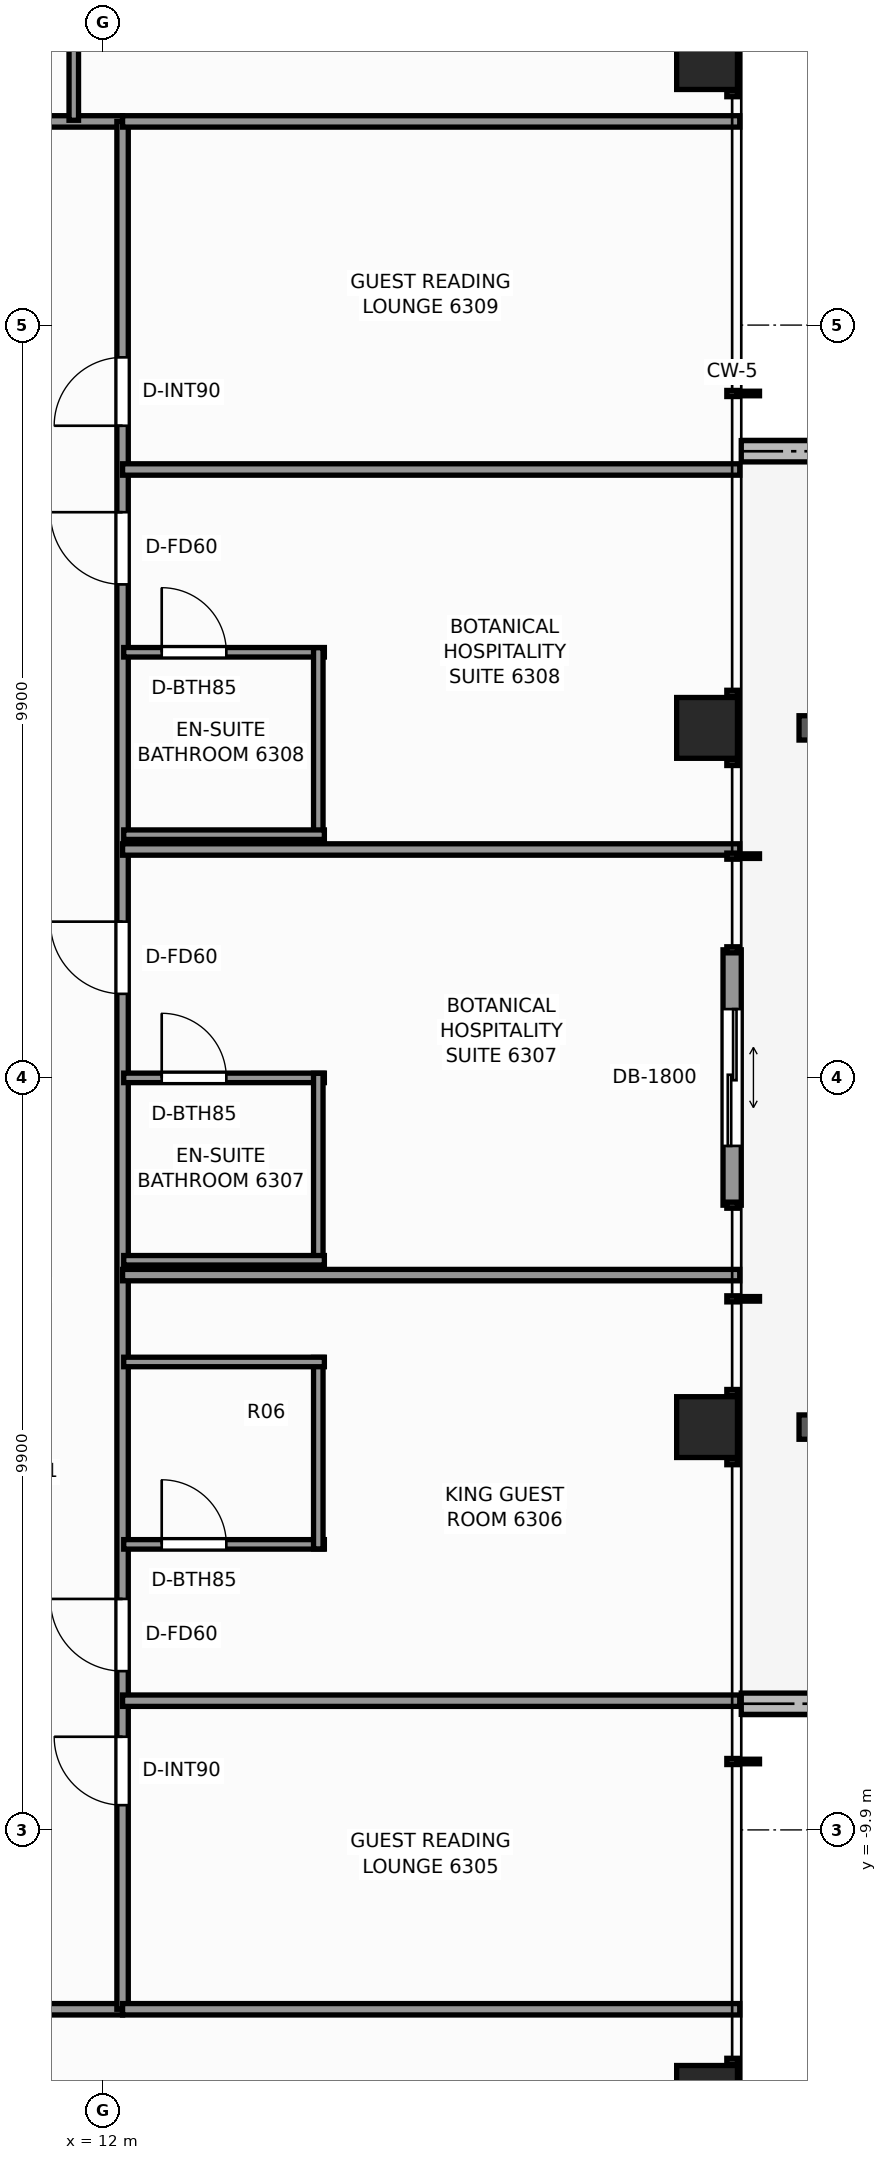
"""IFC4 building model, lengths in metres.
Left out: names, types, materials, properties, quantities, classifications, styles, units other than length and angle.
Written with IfcOpenShell. Run it as: python <this file> out.ifc"""

import sys

from ifc_helpers import new_model, si_unit, direction, frame, frame_2d, origin, origin_2d, place, context, subcontext, project, spatial, rectangle, extrude, element, fill, save


model = new_model("IFC4")
c1 = context("Model", 3, precision=1e-05, world=origin(), true_north=direction((0.0, 1.0)))
c2 = subcontext(c1, "Body", "Model", "MODEL_VIEW")
j1 = project(units=[si_unit("LENGTHUNIT", "METRE"), si_unit("PLANEANGLEUNIT", "RADIAN")], contexts=[c1])
p1 = place(None, origin())
s1 = spatial("IfcSite", under=j1, at=p1, CompositionType="ELEMENT")
p2 = place(p1, origin())
s2 = spatial("IfcBuilding", under=s1, at=p2, CompositionType="ELEMENT")
p3 = place(p2, frame((0.0, 0.0, 216.3)))
s3 = spatial("IfcBuildingStorey", under=s2, at=p3, CompositionType="ELEMENT", Elevation=216.3)
for number, where, z_axis, x_axis in (
    (1, (19.95, -13.4, 0.0), (0.0, 0.0, 1.0), (1.0, 0.0, 0.0)),
    (2, (19.95, -4.6, 0.0), (0.0, 0.0, 1.0), (1.0, 0.0, 0.0)),
    (3, (19.95, 4.6, 0.0), (0.0, 0.0, 1.0), (1.0, 0.0, 0.0)),
    (4, (19.95, 13.4, 0.0), (0.0, 0.0, 1.0), (1.0, 0.0, 0.0)),
):
    element("IfcColumn", number, at=place(p3, frame(where, z_axis=z_axis, x_axis=x_axis)), inside=s3, PredefinedType="COLUMN", context=c2, shape_type="SweptSolid", body=[
        extrude(rectangle(XDim=0.8, YDim=0.8, at=origin_2d()), origin(), (0.0, 0.0, 1.0), 3.3),
    ])
p4 = place(p3, frame((22.105, 8.24, -0.04), z_axis=(0.0, 0.0, 1.0), x_axis=(-1.0, 0.0, 0.0)))
e5 = element("IfcWall", 5, at=p4, inside=s3, PredefinedType="PARAPET", context=c2, shape_type="SweptSolid", body=[
    extrude(rectangle(XDim=1.705, YDim=0.28, at=frame_2d((0.853, 0.0))), origin(), (0.0, 0.0, 1.0), 0.42),
])
p5 = place(p3, frame((20.4, -8.24, -0.04), z_axis=(0.0, 0.0, 1.0), x_axis=(1.0, 0.0, 0.0)))
e6 = element("IfcWall", 6, at=p5, inside=s3, PredefinedType="PARAPET", context=c2, shape_type="SweptSolid", body=[
    extrude(rectangle(XDim=2.975, YDim=0.28, at=frame_2d((1.487, 0.0))), origin(), (0.0, 0.0, 1.0), 0.42),
])
p6 = place(p3, frame((20.28, 1.68, 0.0), z_axis=(0.0, 0.0, 1.0), x_axis=(0.0, -1.0, 0.0)))
e7 = element("IfcWall", 7, at=p6, inside=s3, PredefinedType="STANDARD", context=c2, shape_type="SweptSolid", body=[
    extrude(rectangle(XDim=3.36, YDim=0.24, at=frame_2d((1.68, 0.0))), origin(), (0.0, 0.0, 1.0), 3.08),
])
p7 = place(p6, frame((0.78, 0.0, 0.0)))
e8 = element("IfcOpeningElement", 8, at=p7, cuts=e7, PredefinedType="OPENING", context=c2, shape_type="SweptSolid", body=[
    extrude(rectangle(XDim=1.8, YDim=2.2, at=frame_2d((0.9, 1.1))), frame((0.0, 0.13, 0.0), z_axis=(0.0, -1.0, 0.0), x_axis=(1.0, 0.0, 0.0)), (0.0, 0.0, 1.0), 0.26),
])
p8 = place(p3, frame((-12.26, -12.26, 0.0), z_axis=(0.0, 0.0, 1.0), x_axis=(1.0, 0.0, 0.0)))
e9 = element("IfcWall", 9, at=p8, inside=s3, PredefinedType="PARTITIONING", context=c2, shape_type="SweptSolid", body=[
    extrude(rectangle(XDim=24.52, YDim=0.15, at=frame_2d((12.26, 0.0))), origin(), (0.0, 0.0, 1.0), 2.369),
])
p9 = place(p8, frame((3.427, 0.0, 0.0)))
e10 = element("IfcOpeningElement", 10, at=p9, cuts=e9, PredefinedType="OPENING", context=c2, shape_type="SweptSolid", body=[
    extrude(rectangle(XDim=0.9, YDim=2.06, at=frame_2d((0.45, 1.03))), frame((0.0, 0.085, 0.0), z_axis=(0.0, -1.0, 0.0), x_axis=(1.0, 0.0, 0.0)), (0.0, 0.0, 1.0), 0.17),
])
p10 = place(p8, frame((5.762, 0.0, 0.0)))
e11 = element("IfcOpeningElement", 11, at=p10, cuts=e9, PredefinedType="OPENING", context=c2, shape_type="SweptSolid", body=[
    extrude(rectangle(XDim=0.9, YDim=2.06, at=frame_2d((0.45, 1.03))), frame((0.0, 0.085, 0.0), z_axis=(0.0, -1.0, 0.0), x_axis=(1.0, 0.0, 0.0)), (0.0, 0.0, 1.0), 0.17),
])
p11 = place(p8, frame((9.473, 0.0, 0.0)))
e12 = element("IfcOpeningElement", 12, at=p11, cuts=e9, PredefinedType="OPENING", context=c2, shape_type="SweptSolid", body=[
    extrude(rectangle(XDim=0.9, YDim=2.06, at=frame_2d((0.45, 1.03))), frame((0.0, 0.085, 0.0), z_axis=(0.0, -1.0, 0.0), x_axis=(1.0, 0.0, 0.0)), (0.0, 0.0, 1.0), 0.17),
])
p12 = place(p8, frame((12.875, 0.0, 0.0)))
e13 = element("IfcOpeningElement", 13, at=p12, cuts=e9, PredefinedType="OPENING", context=c2, shape_type="SweptSolid", body=[
    extrude(rectangle(XDim=0.95, YDim=2.06, at=frame_2d((0.475, 1.03))), frame((0.0, 0.085, 0.0), z_axis=(0.0, -1.0, 0.0), x_axis=(1.0, 0.0, 0.0)), (0.0, 0.0, 1.0), 0.17),
])
p13 = place(p8, frame((18.625, 0.0, 0.0)))
e14 = element("IfcOpeningElement", 14, at=p13, cuts=e9, PredefinedType="OPENING", context=c2, shape_type="SweptSolid", body=[
    extrude(rectangle(XDim=0.9, YDim=2.06, at=frame_2d((0.45, 1.03))), frame((0.0, 0.085, 0.0), z_axis=(0.0, -1.0, 0.0), x_axis=(1.0, 0.0, 0.0)), (0.0, 0.0, 1.0), 0.17),
])
p14 = place(p8, frame((20.959, 0.0, 0.0)))
e15 = element("IfcOpeningElement", 15, at=p14, cuts=e9, PredefinedType="OPENING", context=c2, shape_type="SweptSolid", body=[
    extrude(rectangle(XDim=0.9, YDim=2.06, at=frame_2d((0.45, 1.03))), frame((0.0, 0.085, 0.0), z_axis=(0.0, -1.0, 0.0), x_axis=(1.0, 0.0, 0.0)), (0.0, 0.0, 1.0), 0.17),
])
p15 = place(p3, frame((-12.26, 12.58, 0.0), z_axis=(0.0, 0.0, 1.0), x_axis=(1.0, 0.0, 0.0)))
e16 = element("IfcWall", 16, at=p15, inside=s3, PredefinedType="PARTITIONING", context=c2, shape_type="SweptSolid", body=[
    extrude(rectangle(XDim=24.52, YDim=0.15, at=frame_2d((12.26, 0.0))), origin(), (0.0, 0.0, 1.0), 2.369),
])
p16 = place(p15, frame((3.803, 0.0, 0.0)))
e17 = element("IfcOpeningElement", 17, at=p16, cuts=e16, PredefinedType="OPENING", context=c2, shape_type="SweptSolid", body=[
    extrude(rectangle(XDim=0.95, YDim=2.06, at=frame_2d((0.475, 1.03))), frame((0.0, 0.085, 0.0), z_axis=(0.0, -1.0, 0.0), x_axis=(1.0, 0.0, 0.0)), (0.0, 0.0, 1.0), 0.17),
])
p17 = place(p15, frame((5.762, 0.0, 0.0)))
e18 = element("IfcOpeningElement", 18, at=p17, cuts=e16, PredefinedType="OPENING", context=c2, shape_type="SweptSolid", body=[
    extrude(rectangle(XDim=0.9, YDim=2.06, at=frame_2d((0.45, 1.03))), frame((0.0, 0.085, 0.0), z_axis=(0.0, -1.0, 0.0), x_axis=(1.0, 0.0, 0.0)), (0.0, 0.0, 1.0), 0.17),
])
p18 = place(p15, frame((13.518, 0.0, 0.0)))
e19 = element("IfcOpeningElement", 19, at=p18, cuts=e16, PredefinedType="OPENING", context=c2, shape_type="SweptSolid", body=[
    extrude(rectangle(XDim=0.95, YDim=2.06, at=frame_2d((0.475, 1.03))), frame((0.0, 0.085, 0.0), z_axis=(0.0, -1.0, 0.0), x_axis=(1.0, 0.0, 0.0)), (0.0, 0.0, 1.0), 0.17),
])
p19 = place(p15, frame((17.858, 0.0, 0.0)))
e20 = element("IfcOpeningElement", 20, at=p19, cuts=e16, PredefinedType="OPENING", context=c2, shape_type="SweptSolid", body=[
    extrude(rectangle(XDim=0.9, YDim=2.06, at=frame_2d((0.45, 1.03))), frame((0.0, 0.085, 0.0), z_axis=(0.0, -1.0, 0.0), x_axis=(1.0, 0.0, 0.0)), (0.0, 0.0, 1.0), 0.17),
])
p20 = place(p15, frame((19.767, 0.0, 0.0)))
e21 = element("IfcOpeningElement", 21, at=p20, cuts=e16, PredefinedType="OPENING", context=c2, shape_type="SweptSolid", body=[
    extrude(rectangle(XDim=0.95, YDim=2.06, at=frame_2d((0.475, 1.03))), frame((0.0, 0.085, 0.0), z_axis=(0.0, -1.0, 0.0), x_axis=(1.0, 0.0, 0.0)), (0.0, 0.0, 1.0), 0.17),
])
p21 = place(p3, frame((12.26, -12.26, 0.0), z_axis=(0.0, 0.0, 1.0), x_axis=(0.0, 1.0, 0.0)))
e22 = element("IfcWall", 22, at=p21, inside=s3, PredefinedType="PARTITIONING", context=c2, shape_type="SweptSolid", body=[
    extrude(rectangle(XDim=24.84, YDim=0.15, at=frame_2d((12.42, 0.0))), origin(), (0.0, 0.0, 1.0), 2.369),
])
p22 = place(p21, frame((2.686, 0.0, 0.0)))
e23 = element("IfcOpeningElement", 23, at=p22, cuts=e22, PredefinedType="OPENING", context=c2, shape_type="SweptSolid", body=[
    extrude(rectangle(XDim=0.9, YDim=2.06, at=frame_2d((0.45, 1.03))), frame((0.0, 0.085, 0.0), z_axis=(0.0, -1.0, 0.0), x_axis=(1.0, 0.0, 0.0)), (0.0, 0.0, 1.0), 0.17),
])
p23 = place(p21, frame((4.449, 0.0, 0.0)))
e24 = element("IfcOpeningElement", 24, at=p23, cuts=e22, PredefinedType="OPENING", context=c2, shape_type="SweptSolid", body=[
    extrude(rectangle(XDim=0.95, YDim=2.06, at=frame_2d((0.475, 1.03))), frame((0.0, 0.085, 0.0), z_axis=(0.0, -1.0, 0.0), x_axis=(1.0, 0.0, 0.0)), (0.0, 0.0, 1.0), 0.17),
])
p24 = place(p21, frame((13.361, 0.0, 0.0)))
e25 = element("IfcOpeningElement", 25, at=p24, cuts=e22, PredefinedType="OPENING", context=c2, shape_type="SweptSolid", body=[
    extrude(rectangle(XDim=0.95, YDim=2.06, at=frame_2d((0.475, 1.03))), frame((0.0, 0.085, 0.0), z_axis=(0.0, -1.0, 0.0), x_axis=(1.0, 0.0, 0.0)), (0.0, 0.0, 1.0), 0.17),
])
p25 = place(p21, frame((18.748, 0.0, 0.0)))
e26 = element("IfcOpeningElement", 26, at=p25, cuts=e22, PredefinedType="OPENING", context=c2, shape_type="SweptSolid", body=[
    extrude(rectangle(XDim=0.95, YDim=2.06, at=frame_2d((0.475, 1.03))), frame((0.0, 0.085, 0.0), z_axis=(0.0, -1.0, 0.0), x_axis=(1.0, 0.0, 0.0)), (0.0, 0.0, 1.0), 0.17),
])
p26 = place(p21, frame((20.836, 0.0, 0.0)))
e27 = element("IfcOpeningElement", 27, at=p26, cuts=e22, PredefinedType="OPENING", context=c2, shape_type="SweptSolid", body=[
    extrude(rectangle(XDim=0.9, YDim=2.06, at=frame_2d((0.45, 1.03))), frame((0.0, 0.085, 0.0), z_axis=(0.0, -1.0, 0.0), x_axis=(1.0, 0.0, 0.0)), (0.0, 0.0, 1.0), 0.17),
])
for number, where, z_axis, x_axis in (
    (28, (12.26, -12.26, 0.0), (0.0, 0.0, 1.0), (1.0, 0.0, 0.0)),
    (29, (12.26, 12.58, 0.0), (0.0, 0.0, 1.0), (1.0, 0.0, 0.0)),
):
    element("IfcWall", number, at=place(p3, frame(where, z_axis=z_axis, x_axis=x_axis)), inside=s3, PredefinedType="PARTITIONING", context=c2, shape_type="SweptSolid", body=[
        extrude(rectangle(XDim=8.12, YDim=0.15, at=frame_2d((4.06, 0.0))), origin(), (0.0, 0.0, 1.0), 2.369),
    ])
for number, where, z_axis, x_axis in (
    (30, (12.26, -8.2, 0.0), (0.0, 0.0, 1.0), (1.0, 0.0, 0.0)),
    (31, (12.26, -2.6, 0.0), (0.0, 0.0, 1.0), (1.0, 0.0, 0.0)),
):
    element("IfcWall", number, at=place(p3, frame(where, z_axis=z_axis, x_axis=x_axis)), inside=s3, PredefinedType="PARTITIONING", context=c2, shape_type="SweptSolid", body=[
        extrude(rectangle(XDim=8.12, YDim=0.15, at=frame_2d((4.06, 0.0))), origin(), (0.0, 0.0, 1.0), 2.453),
    ])
p27 = place(p3, frame((12.275, -6.143, 0.0), z_axis=(0.0, 0.0, 1.0), x_axis=(1.0, 0.0, 0.0)))
e32 = element("IfcWall", 32, at=p27, inside=s3, PredefinedType="PARTITIONING", context=c2, shape_type="SweptSolid", body=[
    extrude(rectangle(XDim=2.64, YDim=0.125, at=frame_2d((1.32, 0.0))), origin(), (0.0, 0.0, 1.0), 3.08),
])
p28 = place(p27, frame((0.5, 0.0, 0.0)))
e33 = element("IfcOpeningElement", 33, at=p28, cuts=e32, PredefinedType="OPENING", context=c2, shape_type="SweptSolid", body=[
    extrude(rectangle(XDim=0.85, YDim=2.03, at=frame_2d((0.425, 1.015))), frame((0.0, 0.073, 0.0), z_axis=(0.0, -1.0, 0.0), x_axis=(1.0, 0.0, 0.0)), (0.0, 0.0, 1.0), 0.145),
])
p29 = place(p3, frame((14.835, -6.203, 0.0), z_axis=(0.0, 0.0, 1.0), x_axis=(0.0, 1.0, 0.0)))
e34 = element("IfcWall", 34, at=p29, inside=s3, PredefinedType="PARTITIONING", context=c2, shape_type="SweptSolid", body=[
    extrude(rectangle(XDim=2.52, YDim=0.125, at=frame_2d((1.26, 0.0))), origin(), (0.0, 0.0, 1.0), 2.369),
])
p30 = place(p3, frame((12.275, -3.743, 0.0), z_axis=(0.0, 0.0, 1.0), x_axis=(1.0, 0.0, 0.0)))
e35 = element("IfcWall", 35, at=p30, inside=s3, PredefinedType="PARTITIONING", context=c2, shape_type="SweptSolid", body=[
    extrude(rectangle(XDim=2.64, YDim=0.125, at=frame_2d((1.32, 0.0))), origin(), (0.0, 0.0, 1.0), 3.08),
])
p31 = place(p3, frame((12.26, 3.0, 0.0), z_axis=(0.0, 0.0, 1.0), x_axis=(1.0, 0.0, 0.0)))
e36 = element("IfcWall", 36, at=p31, inside=s3, PredefinedType="PARTITIONING", context=c2, shape_type="SweptSolid", body=[
    extrude(rectangle(XDim=8.12, YDim=0.15, at=frame_2d((4.06, 0.0))), origin(), (0.0, 0.0, 1.0), 2.453),
])
p32 = place(p3, frame((12.275, -0.005, 0.0), z_axis=(0.0, 0.0, 1.0), x_axis=(1.0, 0.0, 0.0)))
e37 = element("IfcWall", 37, at=p32, inside=s3, PredefinedType="PARTITIONING", context=c2, shape_type="SweptSolid", body=[
    extrude(rectangle(XDim=2.64, YDim=0.125, at=frame_2d((1.32, 0.0))), origin(), (0.0, 0.0, 1.0), 2.605),
])
p33 = place(p32, frame((0.5, 0.0, 0.0)))
e38 = element("IfcOpeningElement", 38, at=p33, cuts=e37, PredefinedType="OPENING", context=c2, shape_type="SweptSolid", body=[
    extrude(rectangle(XDim=0.85, YDim=2.03, at=frame_2d((0.425, 1.015))), frame((0.0, 0.073, 0.0), z_axis=(0.0, -1.0, 0.0), x_axis=(1.0, 0.0, 0.0)), (0.0, 0.0, 1.0), 0.145),
])
p34 = place(p3, frame((14.835, -2.465, 0.0), z_axis=(0.0, 0.0, 1.0), x_axis=(0.0, 1.0, 0.0)))
e39 = element("IfcWall", 39, at=p34, inside=s3, PredefinedType="PARTITIONING", context=c2, shape_type="SweptSolid", body=[
    extrude(rectangle(XDim=2.52, YDim=0.125, at=frame_2d((1.26, 0.0))), origin(), (0.0, 0.0, 1.0), 2.605),
])
p35 = place(p3, frame((12.275, -2.405, 0.0), z_axis=(0.0, 0.0, 1.0), x_axis=(1.0, 0.0, 0.0)))
e40 = element("IfcWall", 40, at=p35, inside=s3, PredefinedType="PARTITIONING", context=c2, shape_type="SweptSolid", body=[
    extrude(rectangle(XDim=2.64, YDim=0.125, at=frame_2d((1.32, 0.0))), origin(), (0.0, 0.0, 1.0), 3.08),
])
p36 = place(p3, frame((12.26, 8.0, 0.0), z_axis=(0.0, 0.0, 1.0), x_axis=(1.0, 0.0, 0.0)))
e41 = element("IfcWall", 41, at=p36, inside=s3, PredefinedType="PARTITIONING", context=c2, shape_type="SweptSolid", body=[
    extrude(rectangle(XDim=8.12, YDim=0.15, at=frame_2d((4.06, 0.0))), origin(), (0.0, 0.0, 1.0), 2.453),
])
p37 = place(p3, frame((12.275, 5.595, 0.0), z_axis=(0.0, 0.0, 1.0), x_axis=(1.0, 0.0, 0.0)))
e42 = element("IfcWall", 42, at=p37, inside=s3, PredefinedType="PARTITIONING", context=c2, shape_type="SweptSolid", body=[
    extrude(rectangle(XDim=2.64, YDim=0.125, at=frame_2d((1.32, 0.0))), origin(), (0.0, 0.0, 1.0), 3.08),
])
p38 = place(p37, frame((0.5, 0.0, 0.0)))
e43 = element("IfcOpeningElement", 43, at=p38, cuts=e42, PredefinedType="OPENING", context=c2, shape_type="SweptSolid", body=[
    extrude(rectangle(XDim=0.85, YDim=2.03, at=frame_2d((0.425, 1.015))), frame((0.0, 0.073, 0.0), z_axis=(0.0, -1.0, 0.0), x_axis=(1.0, 0.0, 0.0)), (0.0, 0.0, 1.0), 0.145),
])
p39 = place(p3, frame((14.835, 3.135, 0.0), z_axis=(0.0, 0.0, 1.0), x_axis=(0.0, 1.0, 0.0)))
e44 = element("IfcWall", 44, at=p39, inside=s3, PredefinedType="PARTITIONING", context=c2, shape_type="SweptSolid", body=[
    extrude(rectangle(XDim=2.52, YDim=0.125, at=frame_2d((1.26, 0.0))), origin(), (0.0, 0.0, 1.0), 2.369),
])
p40 = place(p3, frame((12.275, 3.195, 0.0), z_axis=(0.0, 0.0, 1.0), x_axis=(1.0, 0.0, 0.0)))
e45 = element("IfcWall", 45, at=p40, inside=s3, PredefinedType="PARTITIONING", context=c2, shape_type="SweptSolid", body=[
    extrude(rectangle(XDim=2.64, YDim=0.125, at=frame_2d((1.32, 0.0))), origin(), (0.0, 0.0, 1.0), 3.08),
])
p41 = place(p3, frame((11.618, 12.595, 0.0), z_axis=(0.0, 0.0, 1.0), x_axis=(0.0, 1.0, 0.0)))
e46 = element("IfcWall", 46, at=p41, inside=s3, PredefinedType="PARTITIONING", context=c2, shape_type="SweptSolid", body=[
    extrude(rectangle(XDim=2.64, YDim=0.125, at=frame_2d((1.32, 0.0))), origin(), (0.0, 0.0, 1.0), 2.369),
])
p42 = place(p7, origin())
e47 = element("IfcDoor", 47, at=p42, inside=s3, OperationType="DOUBLE_DOOR_SLIDING", PredefinedType="DOOR", context=c2, shape_type="SweptSolid", body=[
    extrude(rectangle(XDim=1.8, YDim=2.2, at=frame_2d((0.9, 1.1))), frame((0.0, 0.025, 0.0), z_axis=(0.0, -1.0, 0.0), x_axis=(1.0, 0.0, 0.0)), (0.0, 0.0, 1.0), 0.05),
])
fill(e8, e47)
p43 = place(p22, origin())
e48 = element("IfcDoor", 48, at=p43, inside=s3, OperationType="SINGLE_SWING_RIGHT", PredefinedType="DOOR", context=c2, shape_type="SweptSolid", body=[
    extrude(rectangle(XDim=0.9, YDim=2.06, at=frame_2d((0.45, 1.03))), frame((0.0, 0.025, 0.0), z_axis=(0.0, -1.0, 0.0), x_axis=(1.0, 0.0, 0.0)), (0.0, 0.0, 1.0), 0.05),
])
fill(e23, e48)
p44 = place(p28, origin())
e49 = element("IfcDoor", 49, at=p44, inside=s3, OperationType="SINGLE_SWING_LEFT", PredefinedType="DOOR", context=c2, shape_type="SweptSolid", body=[
    extrude(rectangle(XDim=0.85, YDim=2.03, at=frame_2d((0.425, 1.015))), frame((0.0, 0.025, 0.0), z_axis=(0.0, -1.0, 0.0), x_axis=(1.0, 0.0, 0.0)), (0.0, 0.0, 1.0), 0.05),
])
fill(e33, e49)
p45 = place(p23, origin())
e50 = element("IfcDoor", 50, at=p45, inside=s3, OperationType="SINGLE_SWING_RIGHT", PredefinedType="DOOR", context=c2, shape_type="SweptSolid", body=[
    extrude(rectangle(XDim=0.95, YDim=2.06, at=frame_2d((0.475, 1.03))), frame((0.0, 0.025, 0.0), z_axis=(0.0, -1.0, 0.0), x_axis=(1.0, 0.0, 0.0)), (0.0, 0.0, 1.0), 0.05),
])
fill(e24, e50)
p46 = place(p33, origin())
e51 = element("IfcDoor", 51, at=p46, inside=s3, OperationType="SINGLE_SWING_LEFT", PredefinedType="DOOR", context=c2, shape_type="SweptSolid", body=[
    extrude(rectangle(XDim=0.85, YDim=2.03, at=frame_2d((0.425, 1.015))), frame((0.0, 0.025, 0.0), z_axis=(0.0, -1.0, 0.0), x_axis=(1.0, 0.0, 0.0)), (0.0, 0.0, 1.0), 0.05),
])
fill(e38, e51)
p47 = place(p24, origin())
e52 = element("IfcDoor", 52, at=p47, inside=s3, OperationType="SINGLE_SWING_RIGHT", PredefinedType="DOOR", context=c2, shape_type="SweptSolid", body=[
    extrude(rectangle(XDim=0.95, YDim=2.06, at=frame_2d((0.475, 1.03))), frame((0.0, 0.025, 0.0), z_axis=(0.0, -1.0, 0.0), x_axis=(1.0, 0.0, 0.0)), (0.0, 0.0, 1.0), 0.05),
])
fill(e25, e52)
p48 = place(p38, origin())
e53 = element("IfcDoor", 53, at=p48, inside=s3, OperationType="SINGLE_SWING_LEFT", PredefinedType="DOOR", context=c2, shape_type="SweptSolid", body=[
    extrude(rectangle(XDim=0.85, YDim=2.03, at=frame_2d((0.425, 1.015))), frame((0.0, 0.025, 0.0), z_axis=(0.0, -1.0, 0.0), x_axis=(1.0, 0.0, 0.0)), (0.0, 0.0, 1.0), 0.05),
])
fill(e43, e53)
p49 = place(p25, origin())
e54 = element("IfcDoor", 54, at=p49, inside=s3, OperationType="SINGLE_SWING_RIGHT", PredefinedType="DOOR", context=c2, shape_type="SweptSolid", body=[
    extrude(rectangle(XDim=0.95, YDim=2.06, at=frame_2d((0.475, 1.03))), frame((0.0, 0.025, 0.0), z_axis=(0.0, -1.0, 0.0), x_axis=(1.0, 0.0, 0.0)), (0.0, 0.0, 1.0), 0.05),
])
fill(e26, e54)
p50 = place(p26, origin())
e55 = element("IfcDoor", 55, at=p50, inside=s3, OperationType="SINGLE_SWING_LEFT", PredefinedType="DOOR", context=c2, shape_type="SweptSolid", body=[
    extrude(rectangle(XDim=0.9, YDim=2.06, at=frame_2d((0.45, 1.03))), frame((0.0, 0.025, 0.0), z_axis=(0.0, -1.0, 0.0), x_axis=(1.0, 0.0, 0.0)), (0.0, 0.0, 1.0), 0.05),
])
fill(e27, e55)
save(model, sys.argv[1])
